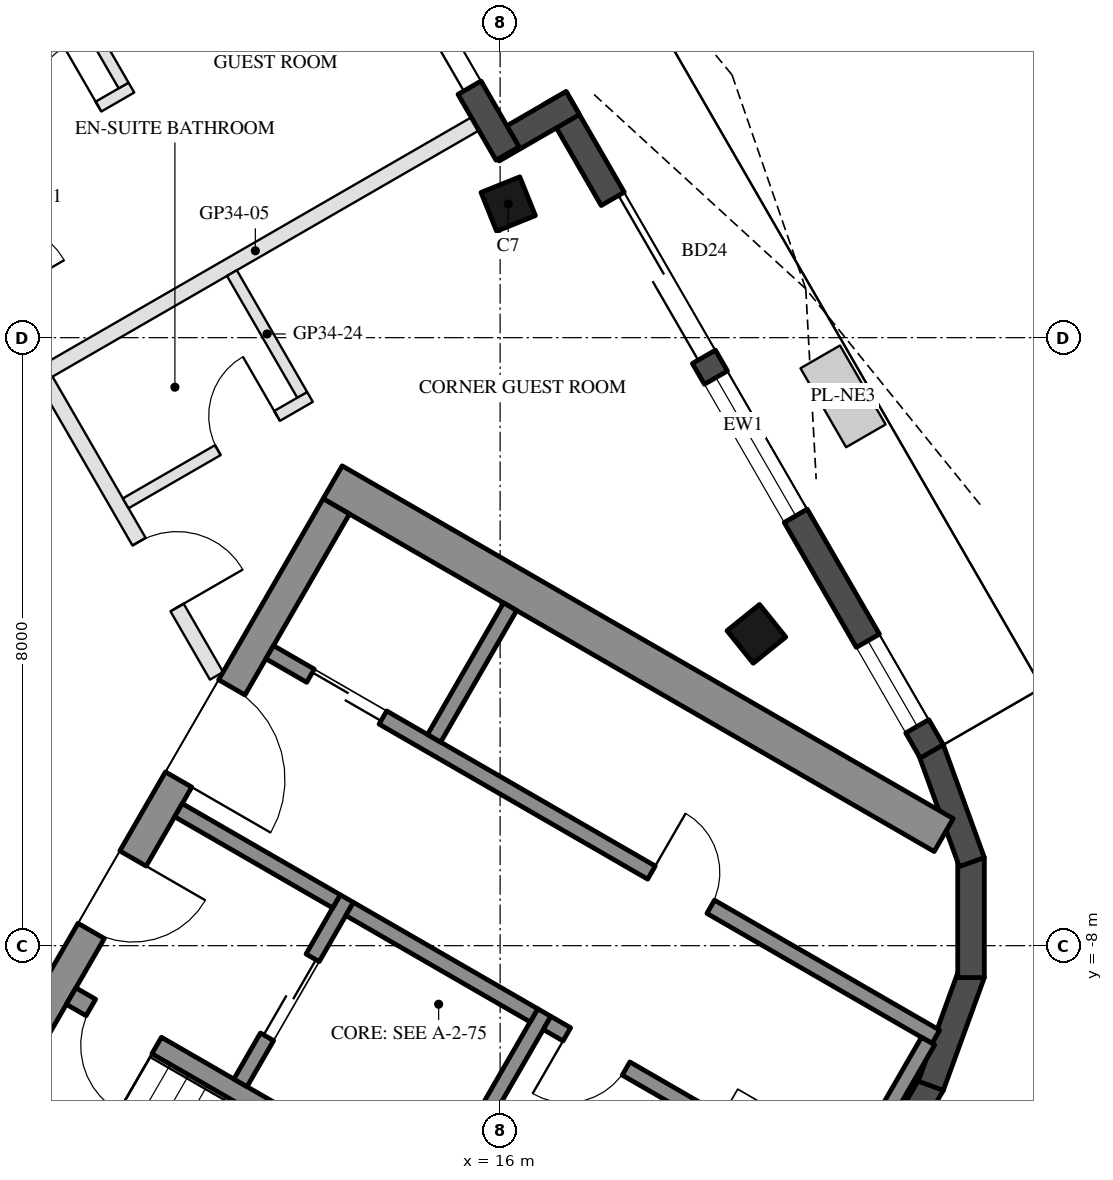
"""IFC4 building model, lengths in metres.
Left out: names, types, materials, properties, quantities, classifications, styles, units other than length and angle.
Written with IfcOpenShell. Run it as: python <this file> out.ifc"""

import sys

from ifc_helpers import new_model, si_unit, direction, frame, frame_2d, origin, origin_2d, place, context, subcontext, project, spatial, rectangle, hollow_rectangle, extrude, boolean, halfspace, element, fill, save


model = new_model("IFC4")
c1 = context("Model", 3, precision=1e-05, world=origin(), true_north=direction((0.0, 1.0)))
c2 = subcontext(c1, "Body", "Model", "MODEL_VIEW")
j1 = project(units=[si_unit("LENGTHUNIT", "METRE"), si_unit("PLANEANGLEUNIT", "RADIAN")], contexts=[c1])
p1 = place(None, origin())
s1 = spatial("IfcSite", under=j1, at=p1, CompositionType="ELEMENT")
p2 = place(p1, origin())
s2 = spatial("IfcBuilding", under=s1, at=p2, CompositionType="ELEMENT")
p3 = place(p2, frame((0.0, 0.0, 320.7)))
s3 = spatial("IfcBuildingStorey", under=s2, at=p3, CompositionType="ELEMENT", Elevation=320.7)
p4 = place(p3, frame((19.372, -3.898, 0.0), z_axis=(-0.190735471498, 0.029652697198, 0.981193506634), x_axis=(0.48820144503, -0.864299133312, 0.121022135277)))
e1 = element("IfcColumn", 1, at=p4, inside=s3, PredefinedType="COLUMN", context=c2, shape_type="SweptSolid", body=[
    boolean("DIFFERENCE", boolean("DIFFERENCE", extrude(hollow_rectangle(XDim=0.55, YDim=0.55, WallThickness=0.025, at=origin_2d()), origin(), (0.0, 0.0, 1.0), 3.771), halfspace(frame((0.0, 0.0, 0.04), z_axis=(0.0, 0.0, 1.0), x_axis=(1.0, 0.0, 0.0)), True)), halfspace(frame((0.0, 0.0, 3.731), z_axis=(0.0, 0.0, 1.0), x_axis=(1.0, 0.0, 0.0)), False)),
])
p5 = place(p3, frame((16.106, 1.758, 0.0), z_axis=(-0.16132511193, -0.02291623866, 0.98663521844), x_axis=(0.495162384909, -0.866667980787, 0.060834395287)))
e2 = element("IfcColumn", 2, at=p5, inside=s3, PredefinedType="COLUMN", context=c2, shape_type="SweptSolid", body=[
    boolean("DIFFERENCE", boolean("DIFFERENCE", extrude(hollow_rectangle(XDim=0.55, YDim=0.55, WallThickness=0.025, at=origin_2d()), origin(), (0.0, 0.0, 1.0), 3.75), halfspace(frame((0.0, 0.0, 0.034), z_axis=(0.0, 0.0, 1.0), x_axis=(1.0, 0.0, 0.0)), True)), halfspace(frame((0.0, 0.0, 3.716), z_axis=(0.0, 0.0, 1.0), x_axis=(1.0, 0.0, 0.0)), False)),
])
p6 = place(p3, frame((19.492, -11.254, 0.0), z_axis=(-0.190406849863, 0.109944185114, 0.975529347424), x_axis=(0.500043453909, 0.866000314205, 0.0)))
e3 = element("IfcColumn", 3, at=p6, inside=s3, PredefinedType="COLUMN", context=c2, shape_type="SweptSolid", body=[
    boolean("DIFFERENCE", boolean("DIFFERENCE", extrude(hollow_rectangle(XDim=2.0, YDim=2.0, WallThickness=0.05, at=origin_2d()), origin(), (0.0, 0.0, 1.0), 3.793), halfspace(frame((0.0, 0.0, 0.113), z_axis=(0.0, 0.0, 1.0), x_axis=(1.0, 0.0, 0.0)), True)), halfspace(frame((0.0, 0.0, 3.679), z_axis=(0.0, 0.0, 1.0), x_axis=(1.0, 0.0, 0.0)), False)),
])
p7 = place(p3, frame((19.34, -13.867, 0.0), z_axis=(0.0, 0.0, 1.0), x_axis=(0.500023656998, 0.86601174498, 0.0)))
e4 = element("IfcWall", 4, at=p7, inside=s3, PredefinedType="SOLIDWALL", context=c2, shape_type="SweptSolid", body=[
    extrude(rectangle(XDim=4.677, YDim=0.35, at=frame_2d((2.339, 0.0))), origin(), (0.0, 0.0, 1.0), 3.55),
])
for number, where, z_axis, x_axis in (
    (5, (21.666, -9.844, 0.0), (0.0, 0.0, 1.0), (0.342, 0.94, 0.0)),
    (6, (22.196, -8.42, 0.0), (0.0, 0.0, 1.0), (0.0, 1.0, 0.0)),
    (7, (22.206, -6.9, 0.0), (0.0, 0.0, 1.0), (-0.342, 0.94, 0.0)),
):
    element("IfcWall", number, at=place(p3, frame(where, z_axis=z_axis, x_axis=x_axis)), inside=s3, PredefinedType="SOLIDWALL", context=c2, shape_type="SweptSolid", body=[
        extrude(rectangle(XDim=1.579, YDim=0.35, at=frame_2d((0.79, 0.0))), origin(), (0.0, 0.0, 1.0), 3.55),
    ])
p8 = place(p3, frame((21.679, -5.444, 0.0), z_axis=(0.0, 0.0, 1.0), x_axis=(-0.500020587865, 0.866013517049, 0.0)))
e8 = element("IfcWall", 8, at=p8, inside=s3, PredefinedType="SOLIDWALL", context=c2, shape_type="SweptSolid", body=[
    extrude(rectangle(XDim=9.924, YDim=0.35, at=frame_2d((4.962, 0.0))), origin(), (0.0, 0.0, 1.0), 3.55),
])
p9 = place(p8, frame((0.381, 0.0, 0.3)))
e9 = element("IfcOpeningElement", 9, at=p9, cuts=e8, PredefinedType="OPENING", context=c2, shape_type="SweptSolid", body=[
    extrude(rectangle(XDim=1.3, YDim=2.65, at=frame_2d((0.65, 1.325))), frame((0.0, 0.185, 0.0), z_axis=(0.0, -1.0, 0.0), x_axis=(1.0, 0.0, 0.0)), (0.0, 0.0, 1.0), 0.37),
])
p10 = place(p8, frame((5.995, 0.0, 0.0)))
e10 = element("IfcOpeningElement", 10, at=p10, cuts=e8, PredefinedType="OPENING", context=c2, shape_type="SweptSolid", body=[
    extrude(rectangle(XDim=2.4, YDim=2.4, at=frame_2d((1.2, 1.2))), frame((0.0, 0.185, 0.0), z_axis=(0.0, -1.0, 0.0), x_axis=(1.0, 0.0, 0.0)), (0.0, 0.0, 1.0), 0.37),
])
p11 = place(p8, frame((3.579, 0.0, 0.3)))
e11 = element("IfcOpeningElement", 11, at=p11, cuts=e8, PredefinedType="OPENING", context=c2, shape_type="SweptSolid", body=[
    extrude(rectangle(XDim=2.1, YDim=2.65, at=frame_2d((1.05, 1.325))), frame((0.0, 0.185, 0.0), z_axis=(0.0, -1.0, 0.0), x_axis=(1.0, 0.0, 0.0)), (0.0, 0.0, 1.0), 0.37),
])
p12 = place(p3, frame((16.956, 3.086, 0.0), z_axis=(0.0, 0.0, 1.0), x_axis=(-0.866005645448, -0.500034220881, 0.0)))
e12 = element("IfcWall", 12, at=p12, inside=s3, PredefinedType="SOLIDWALL", context=c2, shape_type="SweptSolid", body=[
    extrude(rectangle(XDim=1.22, YDim=0.35, at=frame_2d((0.61, 0.0))), origin(), (0.0, 0.0, 1.0), 3.55),
])
p13 = place(p3, frame((16.098, 2.423, 0.0), z_axis=(0.0, 0.0, 1.0), x_axis=(-0.499996591357, 0.866027371756, 0.0)))
e13 = element("IfcWall", 13, at=p13, inside=s3, PredefinedType="SOLIDWALL", context=c2, shape_type="SweptSolid", body=[
    extrude(rectangle(XDim=5.371, YDim=0.35, at=frame_2d((2.685, 0.0))), origin(), (0.0, 0.0, 1.0), 3.55),
])
p14 = place(p13, frame((1.0, 0.0, 0.0)))
e14 = element("IfcOpeningElement", 14, at=p14, cuts=e13, PredefinedType="OPENING", context=c2, shape_type="SweptSolid", body=[
    extrude(rectangle(XDim=1.8, YDim=2.4, at=frame_2d((0.9, 1.2))), frame((0.0, 0.185, 0.0), z_axis=(0.0, -1.0, 0.0), x_axis=(1.0, 0.0, 0.0)), (0.0, 0.0, 1.0), 0.37),
])
p15 = place(p13, frame((3.1, 0.0, 0.3)))
e15 = element("IfcOpeningElement", 15, at=p15, cuts=e13, PredefinedType="OPENING", context=c2, shape_type="SweptSolid", body=[
    extrude(rectangle(XDim=1.5, YDim=2.65, at=frame_2d((0.75, 1.325))), frame((0.0, 0.185, 0.0), z_axis=(0.0, -1.0, 0.0), x_axis=(1.0, 0.0, 0.0)), (0.0, 0.0, 1.0), 0.37),
])
p16 = place(p3, frame((13.797, -1.903, 0.0), z_axis=(0.0, 0.0, 1.0), x_axis=(0.866025286072, -0.500000203884, 0.0)))
e16 = element("IfcWall", 16, at=p16, inside=s3, PredefinedType="SHEAR", context=c2, shape_type="SweptSolid", body=[
    extrude(rectangle(XDim=9.283, YDim=0.5, at=frame_2d((4.641, 0.0))), origin(), (0.0, 0.0, 1.0), 3.5),
])
p17 = place(p3, frame((8.845, -10.88, 0.0), z_axis=(0.0, 0.0, 1.0), x_axis=(0.500004234368, 0.866022959057, 0.0)))
e17 = element("IfcWall", 17, at=p17, inside=s3, PredefinedType="SHEAR", context=c2, shape_type="SweptSolid", body=[
    extrude(rectangle(XDim=10.0, YDim=0.4, at=frame_2d((5.0, 0.0))), origin(), (0.0, 0.0, 1.0), 3.5),
])
p18 = place(p17, frame((3.55, 0.0, 0.0)))
e18 = element("IfcOpeningElement", 18, at=p18, cuts=e17, PredefinedType="OPENING", context=c2, shape_type="SweptSolid", body=[
    extrude(rectangle(XDim=1.1, YDim=2.1, at=frame_2d((0.55, 1.05))), frame((0.0, 0.21, 0.0), z_axis=(0.0, -1.0, 0.0), x_axis=(1.0, 0.0, 0.0)), (0.0, 0.0, 1.0), 0.42),
])
p19 = place(p17, frame((5.85, 0.0, 0.0)))
e19 = element("IfcOpeningElement", 19, at=p19, cuts=e17, PredefinedType="OPENING", context=c2, shape_type="SweptSolid", body=[
    extrude(rectangle(XDim=1.4, YDim=2.1, at=frame_2d((0.7, 1.05))), frame((0.0, 0.21, 0.0), z_axis=(0.0, -1.0, 0.0), x_axis=(1.0, 0.0, 0.0)), (0.0, 0.0, 1.0), 0.42),
])
p20 = place(p3, frame((10.356, -8.664, 0.0), z_axis=(0.0, 0.0, 1.0), x_axis=(0.866028629588, -0.499994412703, 0.0)))
e20 = element("IfcWall", 20, at=p20, inside=s3, PredefinedType="SHEAR", context=c2, shape_type="SweptSolid", body=[
    extrude(rectangle(XDim=6.45, YDim=0.25, at=frame_2d((3.225, 0.0))), origin(), (0.0, 0.0, 1.0), 3.5),
])
p21 = place(p20, frame((0.3, 0.0, 0.0)))
e21 = element("IfcOpeningElement", 21, at=p21, cuts=e20, PredefinedType="OPENING", context=c2, shape_type="SweptSolid", body=[
    extrude(rectangle(XDim=1.0, YDim=2.1, at=frame_2d((0.5, 1.05))), frame((0.0, 0.135, 0.0), z_axis=(0.0, -1.0, 0.0), x_axis=(1.0, 0.0, 0.0)), (0.0, 0.0, 1.0), 0.27),
])
p22 = place(p3, frame((15.181, -11.305, 0.0), z_axis=(0.0, 0.0, 1.0), x_axis=(0.49994636267, 0.866056369097, 0.0)))
e22 = element("IfcWall", 22, at=p22, inside=s3, PredefinedType="SHEAR", context=c2, shape_type="SweptSolid", body=[
    extrude(rectangle(XDim=2.8, YDim=0.2, at=frame_2d((1.4, 0.0))), origin(), (0.0, 0.0, 1.0), 3.5),
])
p23 = place(p3, frame((12.583, -9.805, 0.0), z_axis=(0.0, 0.0, 1.0), x_axis=(0.49994636267, 0.866056369097, 0.0)))
e23 = element("IfcWall", 23, at=p23, inside=s3, PredefinedType="SHEAR", context=c2, shape_type="SweptSolid", body=[
    extrude(rectangle(XDim=2.8, YDim=0.2, at=frame_2d((1.4, 0.0))), origin(), (0.0, 0.0, 1.0), 3.5),
])
p24 = place(p23, frame((0.7, 0.0, 0.0)))
e24 = element("IfcOpeningElement", 24, at=p24, cuts=e23, PredefinedType="OPENING", context=c2, shape_type="SweptSolid", body=[
    extrude(rectangle(XDim=1.2, YDim=2.1, at=frame_2d((0.6, 1.05))), frame((0.0, 0.11, 0.0), z_axis=(0.0, -1.0, 0.0), x_axis=(1.0, 0.0, 0.0)), (0.0, 0.0, 1.0), 0.22),
])
p25 = place(p3, frame((11.768, -6.217, 0.0), z_axis=(0.0, 0.0, 1.0), x_axis=(0.866050077142, -0.499957262057, 0.0)))
e25 = element("IfcWall", 25, at=p25, inside=s3, PredefinedType="SHEAR", context=c2, shape_type="SweptSolid", body=[
    extrude(rectangle(XDim=2.4, YDim=0.2, at=frame_2d((1.2, 0.0))), origin(), (0.0, 0.0, 1.0), 3.5),
])
p26 = place(p3, frame((14.02, -7.517, 0.0), z_axis=(0.0, 0.0, 1.0), x_axis=(0.866034573852, -0.49998411664, 0.0)))
e26 = element("IfcWall", 26, at=p26, inside=s3, PredefinedType="SHEAR", context=c2, shape_type="SweptSolid", body=[
    extrude(rectangle(XDim=2.8, YDim=0.2, at=frame_2d((1.4, 0.0))), origin(), (0.0, 0.0, 1.0), 3.5),
])
p27 = place(p3, frame((12.968, -4.138, 0.0), z_axis=(0.0, 0.0, 1.0), x_axis=(0.866025710499, -0.499999468754, 0.0)))
e27 = element("IfcWall", 27, at=p27, inside=s3, PredefinedType="SHEAR", context=c2, shape_type="SweptSolid", body=[
    extrude(rectangle(XDim=10.121, YDim=0.2, at=frame_2d((5.061, 0.0))), origin(), (0.0, 0.0, 1.0), 3.5),
])
p28 = place(p27, frame((0.62, 0.0, 0.0)))
e28 = element("IfcOpeningElement", 28, at=p28, cuts=e27, PredefinedType="OPENING", context=c2, shape_type="SweptSolid", body=[
    extrude(rectangle(XDim=1.1, YDim=2.1, at=frame_2d((0.55, 1.05))), frame((0.0, 0.11, 0.0), z_axis=(0.0, -1.0, 0.0), x_axis=(1.0, 0.0, 0.0)), (0.0, 0.0, 1.0), 0.22),
])
p29 = place(p27, frame((5.8, 0.0, 0.0)))
e29 = element("IfcOpeningElement", 29, at=p29, cuts=e27, PredefinedType="OPENING", context=c2, shape_type="SweptSolid", body=[
    extrude(rectangle(XDim=0.9, YDim=2.1, at=frame_2d((0.45, 1.05))), frame((0.0, 0.11, 0.0), z_axis=(0.0, -1.0, 0.0), x_axis=(1.0, 0.0, 0.0)), (0.0, 0.0, 1.0), 0.22),
])
p30 = place(p3, frame((20.73, -10.814, 0.0), z_axis=(0.0, 0.0, 1.0), x_axis=(0.499961193289, 0.866047807691, 0.0)))
e30 = element("IfcWall", 30, at=p30, inside=s3, PredefinedType="SHEAR", context=c2, shape_type="SweptSolid", body=[
    extrude(rectangle(XDim=1.8, YDim=0.2, at=frame_2d((0.9, 0.0))), origin(), (0.0, 0.0, 1.0), 3.5),
])
p31 = place(p3, frame((16.618, -9.017, 0.0), z_axis=(0.0, 0.0, 1.0), x_axis=(0.866045268016, -0.499965592563, 0.0)))
e31 = element("IfcWall", 31, at=p31, inside=s3, PredefinedType="SHEAR", context=c2, shape_type="SweptSolid", body=[
    extrude(rectangle(XDim=2.608, YDim=0.2, at=frame_2d((1.304, 0.0))), origin(), (0.0, 0.0, 1.0), 3.5),
])
p32 = place(p31, frame((0.3, 0.0, 0.0)))
e32 = element("IfcOpeningElement", 32, at=p32, cuts=e31, PredefinedType="OPENING", context=c2, shape_type="SweptSolid", body=[
    extrude(rectangle(XDim=0.9, YDim=2.1, at=frame_2d((0.45, 1.05))), frame((0.0, 0.11, 0.0), z_axis=(0.0, -1.0, 0.0), x_axis=(1.0, 0.0, 0.0)), (0.0, 0.0, 1.0), 0.22),
])
p33 = place(p3, frame((15.131, -5.272, 0.0), z_axis=(0.0, 0.0, 1.0), x_axis=(0.499972520799, 0.866041268327, 0.0)))
e33 = element("IfcWall", 33, at=p33, inside=s3, PredefinedType="SHEAR", context=c2, shape_type="SweptSolid", body=[
    extrude(rectangle(XDim=2.0, YDim=0.2, at=frame_2d((1.0, 0.0))), origin(), (0.0, 0.0, 1.0), 3.5),
])
p34 = place(p3, frame((15.671, 2.812, 0.0), z_axis=(0.0, 0.0, 1.0), x_axis=(-0.866020588255, -0.50000834065, 0.0)))
e34 = element("IfcWall", 34, at=p34, inside=s3, PredefinedType="PARTITIONING", context=c2, shape_type="SweptSolid", body=[
    extrude(rectangle(XDim=6.678, YDim=0.2, at=frame_2d((3.339, 0.0))), origin(), (0.0, 0.0, 1.0), 3.1),
])
p35 = place(p3, frame((13.413, 6.723, 0.0), z_axis=(0.0, 0.0, 1.0), x_axis=(-0.879890728885, -0.475176078126, 0.0)))
e35 = element("IfcWall", 35, at=p35, inside=s3, PredefinedType="PARTITIONING", context=c2, shape_type="SweptSolid", body=[
    extrude(rectangle(XDim=6.68, YDim=0.2, at=frame_2d((3.34, 0.0))), origin(), (0.0, 0.0, 1.0), 3.1),
])
p36 = place(p3, frame((10.025, -0.563, 0.0), z_axis=(0.0, 0.0, 1.0), x_axis=(0.500000259638, -0.866025253883, 0.0)))
e36 = element("IfcWall", 36, at=p36, inside=s3, PredefinedType="PARTITIONING", context=c2, shape_type="SweptSolid", body=[
    extrude(rectangle(XDim=4.488, YDim=0.2, at=frame_2d((2.244, 0.0))), origin(), (0.0, 0.0, 1.0), 3.15),
])
p37 = place(p36, frame((2.45, 0.0, 0.0)))
e37 = element("IfcOpeningElement", 37, at=p37, cuts=e36, PredefinedType="OPENING", context=c2, shape_type="SweptSolid", body=[
    extrude(rectangle(XDim=1.0, YDim=2.1, at=frame_2d((0.5, 1.05))), frame((0.0, 0.11, 0.0), z_axis=(0.0, -1.0, 0.0), x_axis=(1.0, 0.0, 0.0)), (0.0, 0.0, 1.0), 0.22),
])
p38 = place(p3, frame((11.074, -2.18, 0.0), z_axis=(0.0, 0.0, 1.0), x_axis=(0.866034573852, 0.49998411664, 0.0)))
e38 = element("IfcWall", 38, at=p38, inside=s3, PredefinedType="PARTITIONING", context=c2, shape_type="SweptSolid", body=[
    extrude(rectangle(XDim=2.8, YDim=0.15, at=frame_2d((1.4, 0.0))), origin(), (0.0, 0.0, 1.0), 3.55),
])
p39 = place(p38, frame((1.4, 0.0, 0.0)))
e39 = element("IfcOpeningElement", 39, at=p39, cuts=e38, PredefinedType="OPENING", context=c2, shape_type="SweptSolid", body=[
    extrude(rectangle(XDim=0.9, YDim=2.1, at=frame_2d((0.45, 1.05))), frame((0.0, 0.085, 0.0), z_axis=(0.0, -1.0, 0.0), x_axis=(1.0, 0.0, 0.0)), (0.0, 0.0, 1.0), 0.17),
])
p40 = place(p3, frame((13.396, -0.753, 0.0), z_axis=(0.0, 0.0, 1.0), x_axis=(-0.49994333299, 0.866058118026, 0.0)))
e40 = element("IfcWall", 40, at=p40, inside=s3, PredefinedType="PARTITIONING", context=c2, shape_type="SweptSolid", body=[
    extrude(rectangle(XDim=1.85, YDim=0.15, at=frame_2d((0.925, 0.0))), origin(), (0.0, 0.0, 1.0), 3.15),
])
p41 = place(p3, frame((8.724, 1.89, 0.0), z_axis=(0.0, 0.0, 1.0), x_axis=(0.866018616679, 0.500011755427, 0.0)))
e41 = element("IfcWall", 41, at=p41, inside=s3, PredefinedType="PARTITIONING", context=c2, shape_type="SweptSolid", body=[
    extrude(rectangle(XDim=2.8, YDim=0.15, at=frame_2d((1.4, 0.0))), origin(), (0.0, 0.0, 1.0), 3.55),
])
p42 = place(p41, frame((1.4, 0.0, 0.0)))
e42 = element("IfcOpeningElement", 42, at=p42, cuts=e41, PredefinedType="OPENING", context=c2, shape_type="SweptSolid", body=[
    extrude(rectangle(XDim=0.9, YDim=2.1, at=frame_2d((0.45, 1.05))), frame((0.0, 0.085, 0.0), z_axis=(0.0, -1.0, 0.0), x_axis=(1.0, 0.0, 0.0)), (0.0, 0.0, 1.0), 0.17),
])
p43 = place(p3, frame((11.046, 3.317, 0.0), z_axis=(0.0, 0.0, 1.0), x_axis=(-0.499960902066, 0.86604797581, 0.0)))
e43 = element("IfcWall", 43, at=p43, inside=s3, PredefinedType="PARTITIONING", context=c2, shape_type="SweptSolid", body=[
    extrude(rectangle(XDim=1.773, YDim=0.15, at=frame_2d((0.886, 0.0))), origin(), (0.0, 0.0, 1.0), 3.55),
])
p44 = place(p9, origin())
e44 = element("IfcWindow", 44, at=p44, inside=s3, PartitioningType="SINGLE_PANEL", PredefinedType="WINDOW", context=c2, shape_type="SweptSolid", body=[
    extrude(rectangle(XDim=1.3, YDim=2.65, at=frame_2d((0.65, 1.325))), frame((0.0, 0.03, 0.0), z_axis=(0.0, -1.0, 0.0), x_axis=(1.0, 0.0, 0.0)), (0.0, 0.0, 1.0), 0.06),
])
fill(e9, e44)
p45 = place(p10, frame((2.4, 0.0, 0.0), z_axis=(0.0, 0.0, 1.0), x_axis=(-1.0, 0.0, 0.0)))
e45 = element("IfcDoor", 45, at=p45, inside=s3, OperationType="SLIDING_TO_LEFT", PredefinedType="DOOR", context=c2, shape_type="SweptSolid", body=[
    extrude(rectangle(XDim=2.4, YDim=2.4, at=frame_2d((1.2, 1.2))), frame((0.0, 0.025, 0.0), z_axis=(0.0, -1.0, 0.0), x_axis=(1.0, 0.0, 0.0)), (0.0, 0.0, 1.0), 0.05),
])
fill(e10, e45)
p46 = place(p11, origin())
e46 = element("IfcWindow", 46, at=p46, inside=s3, PartitioningType="SINGLE_PANEL", PredefinedType="WINDOW", context=c2, shape_type="SweptSolid", body=[
    extrude(rectangle(XDim=2.1, YDim=2.65, at=frame_2d((1.05, 1.325))), frame((0.0, 0.03, 0.0), z_axis=(0.0, -1.0, 0.0), x_axis=(1.0, 0.0, 0.0)), (0.0, 0.0, 1.0), 0.06),
])
fill(e11, e46)
p47 = place(p14, frame((1.8, 0.0, 0.0), z_axis=(0.0, 0.0, 1.0), x_axis=(-1.0, 0.0, 0.0)))
e47 = element("IfcDoor", 47, at=p47, inside=s3, OperationType="SLIDING_TO_LEFT", PredefinedType="DOOR", context=c2, shape_type="SweptSolid", body=[
    extrude(rectangle(XDim=1.8, YDim=2.4, at=frame_2d((0.9, 1.2))), frame((0.0, 0.025, 0.0), z_axis=(0.0, -1.0, 0.0), x_axis=(1.0, 0.0, 0.0)), (0.0, 0.0, 1.0), 0.05),
])
fill(e14, e47)
p48 = place(p24, origin())
e48 = element("IfcDoor", 48, at=p48, inside=s3, OperationType="DOUBLE_DOOR_SLIDING", PredefinedType="DOOR", context=c2, shape_type="SweptSolid", body=[
    extrude(rectangle(XDim=1.2, YDim=2.1, at=frame_2d((0.6, 1.05))), frame((0.0, 0.025, 0.0), z_axis=(0.0, -1.0, 0.0), x_axis=(1.0, 0.0, 0.0)), (0.0, 0.0, 1.0), 0.05),
])
fill(e24, e48)
p49 = place(p28, origin())
e49 = element("IfcDoor", 49, at=p49, inside=s3, OperationType="DOUBLE_DOOR_SLIDING", PredefinedType="DOOR", context=c2, shape_type="SweptSolid", body=[
    extrude(rectangle(XDim=1.1, YDim=2.1, at=frame_2d((0.55, 1.05))), frame((0.0, 0.025, 0.0), z_axis=(0.0, -1.0, 0.0), x_axis=(1.0, 0.0, 0.0)), (0.0, 0.0, 1.0), 0.05),
])
fill(e28, e49)
p50 = place(p29, origin())
e50 = element("IfcDoor", 50, at=p50, inside=s3, OperationType="SINGLE_SWING_LEFT", PredefinedType="DOOR", context=c2, shape_type="SweptSolid", body=[
    extrude(rectangle(XDim=0.9, YDim=2.1, at=frame_2d((0.45, 1.05))), frame((0.0, 0.025, 0.0), z_axis=(0.0, -1.0, 0.0), x_axis=(1.0, 0.0, 0.0)), (0.0, 0.0, 1.0), 0.05),
])
fill(e29, e50)
p51 = place(p32, frame((0.9, 0.0, 0.0), z_axis=(0.0, 0.0, 1.0), x_axis=(-1.0, 0.0, 0.0)))
e51 = element("IfcDoor", 51, at=p51, inside=s3, OperationType="SINGLE_SWING_RIGHT", PredefinedType="DOOR", context=c2, shape_type="SweptSolid", body=[
    extrude(rectangle(XDim=0.9, YDim=2.1, at=frame_2d((0.45, 1.05))), frame((0.0, 0.025, 0.0), z_axis=(0.0, -1.0, 0.0), x_axis=(1.0, 0.0, 0.0)), (0.0, 0.0, 1.0), 0.05),
])
fill(e32, e51)
p52 = place(p18, frame((1.1, 0.0, 0.0), z_axis=(0.0, 0.0, 1.0), x_axis=(-1.0, 0.0, 0.0)))
e52 = element("IfcDoor", 52, at=p52, inside=s3, OperationType="SINGLE_SWING_LEFT", PredefinedType="DOOR", context=c2, shape_type="SweptSolid", body=[
    extrude(rectangle(XDim=1.1, YDim=2.1, at=frame_2d((0.55, 1.05))), frame((0.0, 0.025, 0.0), z_axis=(0.0, -1.0, 0.0), x_axis=(1.0, 0.0, 0.0)), (0.0, 0.0, 1.0), 0.05),
])
fill(e18, e52)
p53 = place(p19, frame((1.4, 0.0, 0.0), z_axis=(0.0, 0.0, 1.0), x_axis=(-1.0, 0.0, 0.0)))
e53 = element("IfcDoor", 53, at=p53, inside=s3, OperationType="DOUBLE_DOOR_SINGLE_SWING", PredefinedType="DOOR", context=c2, shape_type="SweptSolid", body=[
    extrude(rectangle(XDim=1.4, YDim=2.1, at=frame_2d((0.7, 1.05))), frame((0.0, 0.025, 0.0), z_axis=(0.0, -1.0, 0.0), x_axis=(1.0, 0.0, 0.0)), (0.0, 0.0, 1.0), 0.05),
])
fill(e19, e53)
p54 = place(p21, frame((1.0, 0.0, 0.0), z_axis=(0.0, 0.0, 1.0), x_axis=(-1.0, 0.0, 0.0)))
e54 = element("IfcDoor", 54, at=p54, inside=s3, OperationType="SINGLE_SWING_LEFT", PredefinedType="DOOR", context=c2, shape_type="SweptSolid", body=[
    extrude(rectangle(XDim=1.0, YDim=2.1, at=frame_2d((0.5, 1.05))), frame((0.0, 0.025, 0.0), z_axis=(0.0, -1.0, 0.0), x_axis=(1.0, 0.0, 0.0)), (0.0, 0.0, 1.0), 0.05),
])
fill(e21, e54)
p55 = place(p39, origin())
e55 = element("IfcDoor", 55, at=p55, inside=s3, OperationType="SINGLE_SWING_RIGHT", PredefinedType="DOOR", context=c2, shape_type="SweptSolid", body=[
    extrude(rectangle(XDim=0.9, YDim=2.1, at=frame_2d((0.45, 1.05))), frame((0.0, 0.025, 0.0), z_axis=(0.0, -1.0, 0.0), x_axis=(1.0, 0.0, 0.0)), (0.0, 0.0, 1.0), 0.05),
])
fill(e39, e55)
p56 = place(p37, origin())
e56 = element("IfcDoor", 56, at=p56, inside=s3, OperationType="SINGLE_SWING_RIGHT", PredefinedType="DOOR", context=c2, shape_type="SweptSolid", body=[
    extrude(rectangle(XDim=1.0, YDim=2.1, at=frame_2d((0.5, 1.05))), frame((0.0, 0.025, 0.0), z_axis=(0.0, -1.0, 0.0), x_axis=(1.0, 0.0, 0.0)), (0.0, 0.0, 1.0), 0.05),
])
fill(e37, e56)
p57 = place(p42, origin())
e57 = element("IfcDoor", 57, at=p57, inside=s3, OperationType="SINGLE_SWING_RIGHT", PredefinedType="DOOR", context=c2, shape_type="SweptSolid", body=[
    extrude(rectangle(XDim=0.9, YDim=2.1, at=frame_2d((0.45, 1.05))), frame((0.0, 0.025, 0.0), z_axis=(0.0, -1.0, 0.0), x_axis=(1.0, 0.0, 0.0)), (0.0, 0.0, 1.0), 0.05),
])
fill(e42, e57)
save(model, sys.argv[1])
